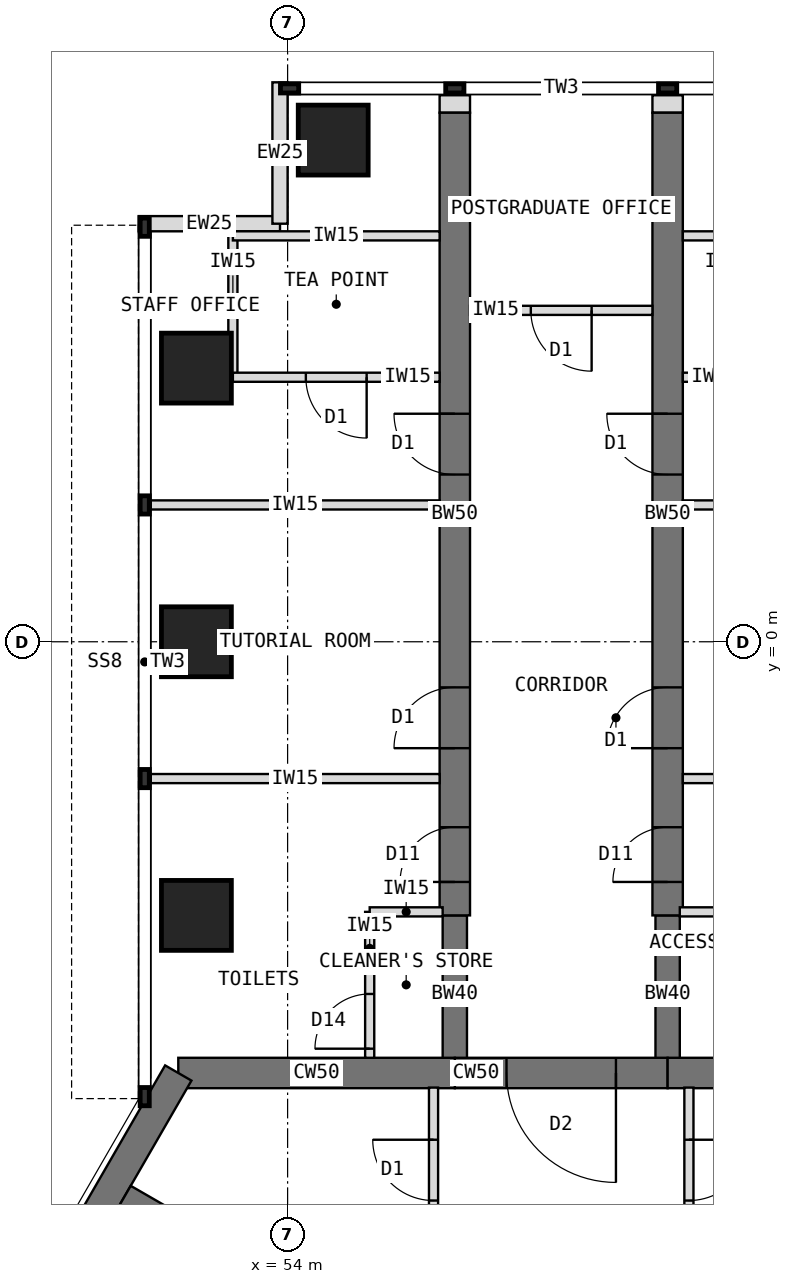
"""IFC4 building model, lengths in metres.
Left out: names, types, materials, properties, quantities, classifications, styles, units other than length and angle.
Written with IfcOpenShell. Run it as: python <this file> out.ifc"""

import sys

from ifc_helpers import new_model, si_unit, direction, frame, frame_2d, origin, origin_2d, place, context, subcontext, project, spatial, rectangle, extrude, element, fill, save


model = new_model("IFC4")
c1 = context("Model", 3, precision=1e-05, world=origin(), true_north=direction((0.0, 1.0)))
c2 = subcontext(c1, "Body", "Model", "MODEL_VIEW")
j1 = project(units=[si_unit("LENGTHUNIT", "METRE"), si_unit("PLANEANGLEUNIT", "RADIAN")], contexts=[c1])
p1 = place(None, origin())
s1 = spatial("IfcSite", under=j1, at=p1, CompositionType="ELEMENT")
p2 = place(p1, origin())
s2 = spatial("IfcBuilding", under=s1, at=p2, CompositionType="ELEMENT")
p3 = place(p2, frame((0.0, 0.0, 206.5)))
s3 = spatial("IfcBuildingStorey", under=s2, at=p3, CompositionType="ELEMENT", Elevation=206.5)
p4 = place(p3, frame((64.798, -7.092, 0.0), z_axis=(0.0, 0.0, 1.0), x_axis=(-1.0, 0.0, 0.0)))
e1 = element("IfcWall", 1, at=p4, inside=s3, PredefinedType="SHEAR", context=c2, shape_type="SweptSolid", body=[
    extrude(rectangle(XDim=4.548, YDim=0.5, at=frame_2d((2.274, 0.0))), origin(), (0.0, 0.0, 1.0), 4.0),
])
p5 = place(p3, frame((60.25, -7.092, 0.0), z_axis=(0.0, 0.0, 1.0), x_axis=(-1.0, 0.0, 0.0)))
e2 = element("IfcWall", 2, at=p5, inside=s3, PredefinedType="SHEAR", context=c2, shape_type="SweptSolid", body=[
    extrude(rectangle(XDim=3.5, YDim=0.5, at=frame_2d((1.75, 0.0))), origin(), (0.0, 0.0, 1.0), 4.0),
])
p6 = place(p5, frame((0.85, 0.0, 0.0)))
e3 = element("IfcOpeningElement", 3, at=p6, cuts=e2, PredefinedType="OPENING", context=c2, shape_type="SweptSolid", body=[
    extrude(rectangle(XDim=1.8, YDim=2.1, at=frame_2d((0.9, 1.05))), frame((0.0, 0.26, 0.0), z_axis=(0.0, -1.0, 0.0), x_axis=(1.0, 0.0, 0.0)), (0.0, 0.0, 1.0), 0.52),
])
p7 = place(p3, frame((56.75, -7.092, 0.0), z_axis=(0.0, 0.0, 1.0), x_axis=(-1.0, 0.0, 0.0)))
e4 = element("IfcWall", 4, at=p7, inside=s3, PredefinedType="SHEAR", context=c2, shape_type="SweptSolid", body=[
    extrude(rectangle(XDim=4.548, YDim=0.5, at=frame_2d((2.274, 0.0))), origin(), (0.0, 0.0, 1.0), 4.0),
])
p8 = place(p3, frame((52.202, -7.092, 0.0), z_axis=(0.0, 0.0, 1.0), x_axis=(-0.500005998175, -0.866021940709, 0.0)))
e5 = element("IfcWall", 5, at=p8, inside=s3, PredefinedType="SHEAR", context=c2, shape_type="SweptSolid", body=[
    extrude(rectangle(XDim=12.596, YDim=0.5, at=frame_2d((6.298, 0.0))), origin(), (0.0, 0.0, 1.0), 4.0),
])
p9 = place(p3, frame((56.75, -7.092, 0.0), z_axis=(0.0, 0.0, 1.0), x_axis=(0.0, 1.0, 0.0)))
e6 = element("IfcWall", 6, at=p9, inside=s3, PredefinedType="SHEAR", context=c2, shape_type="SweptSolid", body=[
    extrude(rectangle(XDim=2.592, YDim=0.4, at=frame_2d((1.296, 0.0))), origin(), (0.0, 0.0, 1.0), 4.0),
])
p10 = place(p3, frame((56.75, -4.5, 0.0), z_axis=(0.0, 0.0, 1.0), x_axis=(0.0, 1.0, 0.0)))
e7 = element("IfcWall", 7, at=p10, inside=s3, PredefinedType="SHEAR", context=c2, shape_type="SweptSolid", body=[
    extrude(rectangle(XDim=13.2, YDim=0.5, at=frame_2d((6.6, 0.0))), origin(), (0.0, 0.0, 1.0), 4.0),
])
p11 = place(p10, frame((0.55, 0.0, 0.0)))
e8 = element("IfcOpeningElement", 8, at=p11, cuts=e7, PredefinedType="OPENING", context=c2, shape_type="SweptSolid", body=[
    extrude(rectangle(XDim=0.9, YDim=2.1, at=frame_2d((0.45, 1.05))), frame((0.0, 0.26, 0.0), z_axis=(0.0, -1.0, 0.0), x_axis=(1.0, 0.0, 0.0)), (0.0, 0.0, 1.0), 0.52),
])
p12 = place(p10, frame((2.75, 0.0, 0.0)))
e9 = element("IfcOpeningElement", 9, at=p12, cuts=e7, PredefinedType="OPENING", context=c2, shape_type="SweptSolid", body=[
    extrude(rectangle(XDim=1.0, YDim=2.1, at=frame_2d((0.5, 1.05))), frame((0.0, 0.26, 0.0), z_axis=(0.0, -1.0, 0.0), x_axis=(1.0, 0.0, 0.0)), (0.0, 0.0, 1.0), 0.52),
])
p13 = place(p10, frame((7.25, 0.0, 0.0)))
e10 = element("IfcOpeningElement", 10, at=p13, cuts=e7, PredefinedType="OPENING", context=c2, shape_type="SweptSolid", body=[
    extrude(rectangle(XDim=1.0, YDim=2.1, at=frame_2d((0.5, 1.05))), frame((0.0, 0.26, 0.0), z_axis=(0.0, -1.0, 0.0), x_axis=(1.0, 0.0, 0.0)), (0.0, 0.0, 1.0), 0.52),
])
p14 = place(p3, frame((60.25, -7.092, 0.0), z_axis=(0.0, 0.0, 1.0), x_axis=(0.0, 1.0, 0.0)))
e11 = element("IfcWall", 11, at=p14, inside=s3, PredefinedType="SHEAR", context=c2, shape_type="SweptSolid", body=[
    extrude(rectangle(XDim=2.592, YDim=0.4, at=frame_2d((1.296, 0.0))), origin(), (0.0, 0.0, 1.0), 4.0),
])
p15 = place(p3, frame((60.25, -4.5, 0.0), z_axis=(0.0, 0.0, 1.0), x_axis=(0.0, 1.0, 0.0)))
e12 = element("IfcWall", 12, at=p15, inside=s3, PredefinedType="SHEAR", context=c2, shape_type="SweptSolid", body=[
    extrude(rectangle(XDim=13.2, YDim=0.5, at=frame_2d((6.6, 0.0))), origin(), (0.0, 0.0, 1.0), 4.0),
])
p16 = place(p15, frame((0.55, 0.0, 0.0)))
e13 = element("IfcOpeningElement", 13, at=p16, cuts=e12, PredefinedType="OPENING", context=c2, shape_type="SweptSolid", body=[
    extrude(rectangle(XDim=0.9, YDim=2.1, at=frame_2d((0.45, 1.05))), frame((0.0, 0.26, 0.0), z_axis=(0.0, -1.0, 0.0), x_axis=(1.0, 0.0, 0.0)), (0.0, 0.0, 1.0), 0.52),
])
p17 = place(p15, frame((2.75, 0.0, 0.0)))
e14 = element("IfcOpeningElement", 14, at=p17, cuts=e12, PredefinedType="OPENING", context=c2, shape_type="SweptSolid", body=[
    extrude(rectangle(XDim=1.0, YDim=2.1, at=frame_2d((0.5, 1.05))), frame((0.0, 0.26, 0.0), z_axis=(0.0, -1.0, 0.0), x_axis=(1.0, 0.0, 0.0)), (0.0, 0.0, 1.0), 0.52),
])
p18 = place(p15, frame((7.25, 0.0, 0.0)))
e15 = element("IfcOpeningElement", 15, at=p18, cuts=e12, PredefinedType="OPENING", context=c2, shape_type="SweptSolid", body=[
    extrude(rectangle(XDim=1.0, YDim=2.1, at=frame_2d((0.5, 1.05))), frame((0.0, 0.26, 0.0), z_axis=(0.0, -1.0, 0.0), x_axis=(1.0, 0.0, 0.0)), (0.0, 0.0, 1.0), 0.52),
])
for number, where, z_axis, x_axis in (
    (16, (52.5, -4.5, 0.0), (0.0, 0.0, 1.0), (1.0, 0.0, 0.0)),
    (17, (52.5, 0.0, 0.0), (0.0, 0.0, 1.0), (1.0, 0.0, 0.0)),
    (18, (52.5, 4.5, 0.0), (0.0, 0.0, 1.0), (1.0, 0.0, 0.0)),
    (19, (54.75, 8.25, 0.0), (0.0, 0.0, 1.0), (1.0, 0.0, 0.0)),
):
    element("IfcColumn", number, at=place(p3, frame(where, z_axis=z_axis, x_axis=x_axis)), inside=s3, PredefinedType="COLUMN", context=c2, shape_type="SweptSolid", body=[
        extrude(rectangle(XDim=1.15, YDim=1.15, at=origin_2d()), origin(), (0.0, 0.0, 1.0), 4.0),
    ])
for number, where, z_axis, x_axis in (
    (20, (51.55, 6.875, 0.0), (0.0, 0.0, 1.0), (1.0, 0.0, 0.0)),
    (21, (53.875, 6.875, 0.0), (0.0, 0.0, 1.0), (0.0, 1.0, 0.0)),
):
    element("IfcWall", number, at=place(p3, frame(where, z_axis=z_axis, x_axis=x_axis)), inside=s3, PredefinedType="STANDARD", context=c2, shape_type="SweptSolid", body=[
        extrude(rectangle(XDim=2.325, YDim=0.25, at=frame_2d((1.163, 0.0))), origin(), (0.0, 0.0, 1.0), 3.8),
    ])
for number, where, z_axis, x_axis in (
    (22, (56.75, 8.7, 0.0), (0.0, 0.0, 1.0), (0.0, 1.0, 0.0)),
    (23, (60.25, 8.7, 0.0), (0.0, 0.0, 1.0), (0.0, 1.0, 0.0)),
):
    element("IfcWall", number, at=place(p3, frame(where, z_axis=z_axis, x_axis=x_axis)), inside=s3, PredefinedType="PARTITIONING", context=c2, shape_type="SweptSolid", body=[
        extrude(rectangle(XDim=0.288, YDim=0.5, at=frame_2d((0.144, 0.0))), origin(), (0.0, 0.0, 1.0), 3.8),
    ])
for number, where, z_axis, x_axis in (
    (24, (56.48, -12.099, 0.0), (0.0, 0.0, 1.0), (-0.866, 0.5, 0.0)),
    (25, (60.52, -12.099, 0.0), (0.0, 0.0, 1.0), (0.866, 0.5, 0.0)),
):
    element("IfcWall", number, at=place(p3, frame(where, z_axis=z_axis, x_axis=x_axis)), inside=s3, PredefinedType="SHEAR", context=c2, shape_type="SweptSolid", body=[
        extrude(rectangle(XDim=5.958, YDim=0.4, at=frame_2d((2.979, 0.0))), origin(), (0.0, 0.0, 1.0), 4.0),
    ])
for number, where, z_axis, x_axis in (
    (26, (56.5, -2.25, 0.0), (0.0, 0.0, 1.0), (-1.0, 0.0, 0.0)),
    (27, (56.5, 2.25, 0.0), (0.0, 0.0, 1.0), (-1.0, 0.0, 0.0)),
):
    element("IfcWall", number, at=place(p3, frame(where, z_axis=z_axis, x_axis=x_axis)), inside=s3, PredefinedType="PARTITIONING", context=c2, shape_type="SweptSolid", body=[
        extrude(rectangle(XDim=4.75, YDim=0.15, at=frame_2d((2.375, 0.0))), origin(), (0.0, 0.0, 1.0), 3.8),
    ])
p19 = place(p3, frame((53.1, 4.35, 0.0), z_axis=(0.0, 0.0, 1.0), x_axis=(0.0, 1.0, 0.0)))
e28 = element("IfcWall", 28, at=p19, inside=s3, PredefinedType="PARTITIONING", context=c2, shape_type="SweptSolid", body=[
    extrude(rectangle(XDim=2.4, YDim=0.15, at=frame_2d((1.2, 0.0))), origin(), (0.0, 0.0, 1.0), 3.8),
])
p20 = place(p3, frame((56.5, 4.35, 0.0), z_axis=(0.0, 0.0, 1.0), x_axis=(-1.0, 0.0, 0.0)))
e29 = element("IfcWall", 29, at=p20, inside=s3, PredefinedType="PARTITIONING", context=c2, shape_type="SweptSolid", body=[
    extrude(rectangle(XDim=3.4, YDim=0.15, at=frame_2d((1.7, 0.0))), origin(), (0.0, 0.0, 1.0), 3.8),
])
p21 = place(p20, frame((1.2, 0.0, 0.0)))
e30 = element("IfcOpeningElement", 30, at=p21, cuts=e29, PredefinedType="OPENING", context=c2, shape_type="SweptSolid", body=[
    extrude(rectangle(XDim=1.0, YDim=2.1, at=frame_2d((0.5, 1.05))), frame((0.0, 0.085, 0.0), z_axis=(0.0, -1.0, 0.0), x_axis=(1.0, 0.0, 0.0)), (0.0, 0.0, 1.0), 0.17),
])
p22 = place(p3, frame((56.5, 6.675, 0.0), z_axis=(0.0, 0.0, 1.0), x_axis=(-1.0, 0.0, 0.0)))
e31 = element("IfcWall", 31, at=p22, inside=s3, PredefinedType="PARTITIONING", context=c2, shape_type="SweptSolid", body=[
    extrude(rectangle(XDim=3.4, YDim=0.15, at=frame_2d((1.7, 0.0))), origin(), (0.0, 0.0, 1.0), 3.8),
])
p23 = place(p3, frame((55.35, -6.842, 0.0), z_axis=(0.0, 0.0, 1.0), x_axis=(0.0, 1.0, 0.0)))
e32 = element("IfcWall", 32, at=p23, inside=s3, PredefinedType="PARTITIONING", context=c2, shape_type="SweptSolid", body=[
    extrude(rectangle(XDim=2.4, YDim=0.15, at=frame_2d((1.2, 0.0))), origin(), (0.0, 0.0, 1.0), 3.8),
])
p24 = place(p23, frame((0.15, 0.0, 0.0)))
e33 = element("IfcOpeningElement", 33, at=p24, cuts=e32, PredefinedType="OPENING", context=c2, shape_type="SweptSolid", body=[
    extrude(rectangle(XDim=0.9, YDim=2.1, at=frame_2d((0.45, 1.05))), frame((0.0, 0.085, 0.0), z_axis=(0.0, -1.0, 0.0), x_axis=(1.0, 0.0, 0.0)), (0.0, 0.0, 1.0), 0.17),
])
p25 = place(p3, frame((56.55, -4.442, 0.0), z_axis=(0.0, 0.0, 1.0), x_axis=(-1.0, 0.0, 0.0)))
e34 = element("IfcWall", 34, at=p25, inside=s3, PredefinedType="PARTITIONING", context=c2, shape_type="SweptSolid", body=[
    extrude(rectangle(XDim=1.2, YDim=0.15, at=frame_2d((0.6, 0.0))), origin(), (0.0, 0.0, 1.0), 3.267),
])
for number, where, z_axis, x_axis in (
    (35, (60.5, -2.25, 0.0), (0.0, 0.0, 1.0), (1.0, 0.0, 0.0)),
    (36, (60.5, 2.25, 0.0), (0.0, 0.0, 1.0), (1.0, 0.0, 0.0)),
):
    element("IfcWall", number, at=place(p3, frame(where, z_axis=z_axis, x_axis=x_axis)), inside=s3, PredefinedType="PARTITIONING", context=c2, shape_type="SweptSolid", body=[
        extrude(rectangle(XDim=4.75, YDim=0.15, at=frame_2d((2.375, 0.0))), origin(), (0.0, 0.0, 1.0), 3.8),
    ])
p26 = place(p3, frame((60.5, 4.35, 0.0), z_axis=(0.0, 0.0, 1.0), x_axis=(1.0, 0.0, 0.0)))
e37 = element("IfcWall", 37, at=p26, inside=s3, PredefinedType="PARTITIONING", context=c2, shape_type="SweptSolid", body=[
    extrude(rectangle(XDim=3.4, YDim=0.15, at=frame_2d((1.7, 0.0))), origin(), (0.0, 0.0, 1.0), 3.8),
])
p27 = place(p26, frame((1.2, 0.0, 0.0)))
e38 = element("IfcOpeningElement", 38, at=p27, cuts=e37, PredefinedType="OPENING", context=c2, shape_type="SweptSolid", body=[
    extrude(rectangle(XDim=1.0, YDim=2.1, at=frame_2d((0.5, 1.05))), frame((0.0, 0.085, 0.0), z_axis=(0.0, -1.0, 0.0), x_axis=(1.0, 0.0, 0.0)), (0.0, 0.0, 1.0), 0.17),
])
p28 = place(p3, frame((60.5, 6.675, 0.0), z_axis=(0.0, 0.0, 1.0), x_axis=(1.0, 0.0, 0.0)))
e39 = element("IfcWall", 39, at=p28, inside=s3, PredefinedType="PARTITIONING", context=c2, shape_type="SweptSolid", body=[
    extrude(rectangle(XDim=3.4, YDim=0.15, at=frame_2d((1.7, 0.0))), origin(), (0.0, 0.0, 1.0), 3.8),
])
p29 = place(p3, frame((60.45, -4.442, 0.0), z_axis=(0.0, 0.0, 1.0), x_axis=(1.0, 0.0, 0.0)))
e40 = element("IfcWall", 40, at=p29, inside=s3, PredefinedType="PARTITIONING", context=c2, shape_type="SweptSolid", body=[
    extrude(rectangle(XDim=3.2, YDim=0.15, at=frame_2d((1.6, 0.0))), origin(), (0.0, 0.0, 1.0), 3.267),
])
p30 = place(p3, frame((56.4, -11.857, 0.0), z_axis=(0.0, 0.0, 1.0), x_axis=(0.0, 1.0, 0.0)))
e41 = element("IfcWall", 41, at=p30, inside=s3, PredefinedType="PARTITIONING", context=c2, shape_type="SweptSolid", body=[
    extrude(rectangle(XDim=4.526, YDim=0.15, at=frame_2d((2.263, 0.0))), origin(), (0.0, 0.0, 1.0), 3.8),
])
p31 = place(p30, frame((2.668, 0.0, 0.0)))
e42 = element("IfcOpeningElement", 42, at=p31, cuts=e41, PredefinedType="OPENING", context=c2, shape_type="SweptSolid", body=[
    extrude(rectangle(XDim=1.0, YDim=2.1, at=frame_2d((0.5, 1.05))), frame((0.0, 0.085, 0.0), z_axis=(0.0, -1.0, 0.0), x_axis=(1.0, 0.0, 0.0)), (0.0, 0.0, 1.0), 0.17),
])
p32 = place(p3, frame((60.6, -7.332, 0.0), z_axis=(0.0, 0.0, 1.0), x_axis=(0.0, -1.0, 0.0)))
e43 = element("IfcWall", 43, at=p32, inside=s3, PredefinedType="PARTITIONING", context=c2, shape_type="SweptSolid", body=[
    extrude(rectangle(XDim=4.526, YDim=0.15, at=frame_2d((2.263, 0.0))), origin(), (0.0, 0.0, 1.0), 3.8),
])
p33 = place(p32, frame((0.858, 0.0, 0.0)))
e44 = element("IfcOpeningElement", 44, at=p33, cuts=e43, PredefinedType="OPENING", context=c2, shape_type="SweptSolid", body=[
    extrude(rectangle(XDim=1.0, YDim=2.1, at=frame_2d((0.5, 1.05))), frame((0.0, 0.085, 0.0), z_axis=(0.0, -1.0, 0.0), x_axis=(1.0, 0.0, 0.0)), (0.0, 0.0, 1.0), 0.17),
])
p34 = place(p3, frame((60.0, 5.45, 0.0), z_axis=(0.0, 0.0, 1.0), x_axis=(-1.0, 0.0, 0.0)))
e45 = element("IfcWall", 45, at=p34, inside=s3, PredefinedType="PARTITIONING", context=c2, shape_type="SweptSolid", body=[
    extrude(rectangle(XDim=3.0, YDim=0.15, at=frame_2d((1.5, 0.0))), origin(), (0.0, 0.0, 1.0), 3.8),
])
p35 = place(p34, frame((1.0, 0.0, 0.0)))
e46 = element("IfcOpeningElement", 46, at=p35, cuts=e45, PredefinedType="OPENING", context=c2, shape_type="SweptSolid", body=[
    extrude(rectangle(XDim=1.0, YDim=2.1, at=frame_2d((0.5, 1.05))), frame((0.0, 0.085, 0.0), z_axis=(0.0, -1.0, 0.0), x_axis=(1.0, 0.0, 0.0)), (0.0, 0.0, 1.0), 0.17),
])
p36 = place(p6, origin())
e47 = element("IfcDoor", 47, at=p36, inside=s3, OperationType="DOUBLE_DOOR_DOUBLE_SWING", PredefinedType="DOOR", context=c2, shape_type="SweptSolid", body=[
    extrude(rectangle(XDim=1.8, YDim=2.1, at=frame_2d((0.9, 1.05))), frame((0.0, 0.025, 0.0), z_axis=(0.0, -1.0, 0.0), x_axis=(1.0, 0.0, 0.0)), (0.0, 0.0, 1.0), 0.05),
])
fill(e3, e47)
p37 = place(p21, origin())
e48 = element("IfcDoor", 48, at=p37, inside=s3, OperationType="SINGLE_SWING_LEFT", PredefinedType="DOOR", context=c2, shape_type="SweptSolid", body=[
    extrude(rectangle(XDim=1.0, YDim=2.1, at=frame_2d((0.5, 1.05))), frame((0.0, 0.025, 0.0), z_axis=(0.0, -1.0, 0.0), x_axis=(1.0, 0.0, 0.0)), (0.0, 0.0, 1.0), 0.05),
])
fill(e30, e48)
p38 = place(p24, origin())
e49 = element("IfcDoor", 49, at=p38, inside=s3, OperationType="SINGLE_SWING_LEFT", PredefinedType="DOOR", context=c2, shape_type="SweptSolid", body=[
    extrude(rectangle(XDim=0.9, YDim=2.1, at=frame_2d((0.45, 1.05))), frame((0.0, 0.025, 0.0), z_axis=(0.0, -1.0, 0.0), x_axis=(1.0, 0.0, 0.0)), (0.0, 0.0, 1.0), 0.05),
])
fill(e33, e49)
p39 = place(p33, origin())
e50 = element("IfcDoor", 50, at=p39, inside=s3, OperationType="SINGLE_SWING_LEFT", PredefinedType="DOOR", context=c2, shape_type="SweptSolid", body=[
    extrude(rectangle(XDim=1.0, YDim=2.1, at=frame_2d((0.5, 1.05))), frame((0.0, 0.025, 0.0), z_axis=(0.0, -1.0, 0.0), x_axis=(1.0, 0.0, 0.0)), (0.0, 0.0, 1.0), 0.05),
])
fill(e44, e50)
p40 = place(p31, origin())
e51 = element("IfcDoor", 51, at=p40, inside=s3, OperationType="SINGLE_SWING_RIGHT", PredefinedType="DOOR", context=c2, shape_type="SweptSolid", body=[
    extrude(rectangle(XDim=1.0, YDim=2.1, at=frame_2d((0.5, 1.05))), frame((0.0, 0.025, 0.0), z_axis=(0.0, -1.0, 0.0), x_axis=(1.0, 0.0, 0.0)), (0.0, 0.0, 1.0), 0.05),
])
fill(e42, e51)
p41 = place(p35, origin())
e52 = element("IfcDoor", 52, at=p41, inside=s3, OperationType="SINGLE_SWING_LEFT", PredefinedType="DOOR", context=c2, shape_type="SweptSolid", body=[
    extrude(rectangle(XDim=1.0, YDim=2.1, at=frame_2d((0.5, 1.05))), frame((0.0, 0.025, 0.0), z_axis=(0.0, -1.0, 0.0), x_axis=(1.0, 0.0, 0.0)), (0.0, 0.0, 1.0), 0.05),
])
fill(e46, e52)
p42 = place(p11, origin())
e53 = element("IfcDoor", 53, at=p42, inside=s3, OperationType="SINGLE_SWING_LEFT", PredefinedType="DOOR", context=c2, shape_type="SweptSolid", body=[
    extrude(rectangle(XDim=0.9, YDim=2.1, at=frame_2d((0.45, 1.05))), frame((0.0, 0.025, 0.0), z_axis=(0.0, -1.0, 0.0), x_axis=(1.0, 0.0, 0.0)), (0.0, 0.0, 1.0), 0.05),
])
fill(e8, e53)
p43 = place(p12, origin())
e54 = element("IfcDoor", 54, at=p43, inside=s3, OperationType="SINGLE_SWING_LEFT", PredefinedType="DOOR", context=c2, shape_type="SweptSolid", body=[
    extrude(rectangle(XDim=1.0, YDim=2.1, at=frame_2d((0.5, 1.05))), frame((0.0, 0.025, 0.0), z_axis=(0.0, -1.0, 0.0), x_axis=(1.0, 0.0, 0.0)), (0.0, 0.0, 1.0), 0.05),
])
fill(e9, e54)
p44 = place(p13, origin())
e55 = element("IfcDoor", 55, at=p44, inside=s3, OperationType="SINGLE_SWING_RIGHT", PredefinedType="DOOR", context=c2, shape_type="SweptSolid", body=[
    extrude(rectangle(XDim=1.0, YDim=2.1, at=frame_2d((0.5, 1.05))), frame((0.0, 0.025, 0.0), z_axis=(0.0, -1.0, 0.0), x_axis=(1.0, 0.0, 0.0)), (0.0, 0.0, 1.0), 0.05),
])
fill(e10, e55)
p45 = place(p16, origin())
e56 = element("IfcDoor", 56, at=p45, inside=s3, OperationType="SINGLE_SWING_LEFT", PredefinedType="DOOR", context=c2, shape_type="SweptSolid", body=[
    extrude(rectangle(XDim=0.9, YDim=2.1, at=frame_2d((0.45, 1.05))), frame((0.0, 0.025, 0.0), z_axis=(0.0, -1.0, 0.0), x_axis=(1.0, 0.0, 0.0)), (0.0, 0.0, 1.0), 0.05),
])
fill(e13, e56)
p46 = place(p17, origin())
e57 = element("IfcDoor", 57, at=p46, inside=s3, OperationType="SINGLE_SWING_LEFT", PredefinedType="DOOR", context=c2, shape_type="SweptSolid", body=[
    extrude(rectangle(XDim=1.0, YDim=2.1, at=frame_2d((0.5, 1.05))), frame((0.0, 0.025, 0.0), z_axis=(0.0, -1.0, 0.0), x_axis=(1.0, 0.0, 0.0)), (0.0, 0.0, 1.0), 0.05),
])
fill(e14, e57)
p47 = place(p18, origin())
e58 = element("IfcDoor", 58, at=p47, inside=s3, OperationType="SINGLE_SWING_RIGHT", PredefinedType="DOOR", context=c2, shape_type="SweptSolid", body=[
    extrude(rectangle(XDim=1.0, YDim=2.1, at=frame_2d((0.5, 1.05))), frame((0.0, 0.025, 0.0), z_axis=(0.0, -1.0, 0.0), x_axis=(1.0, 0.0, 0.0)), (0.0, 0.0, 1.0), 0.05),
])
fill(e15, e58)
save(model, sys.argv[1])
